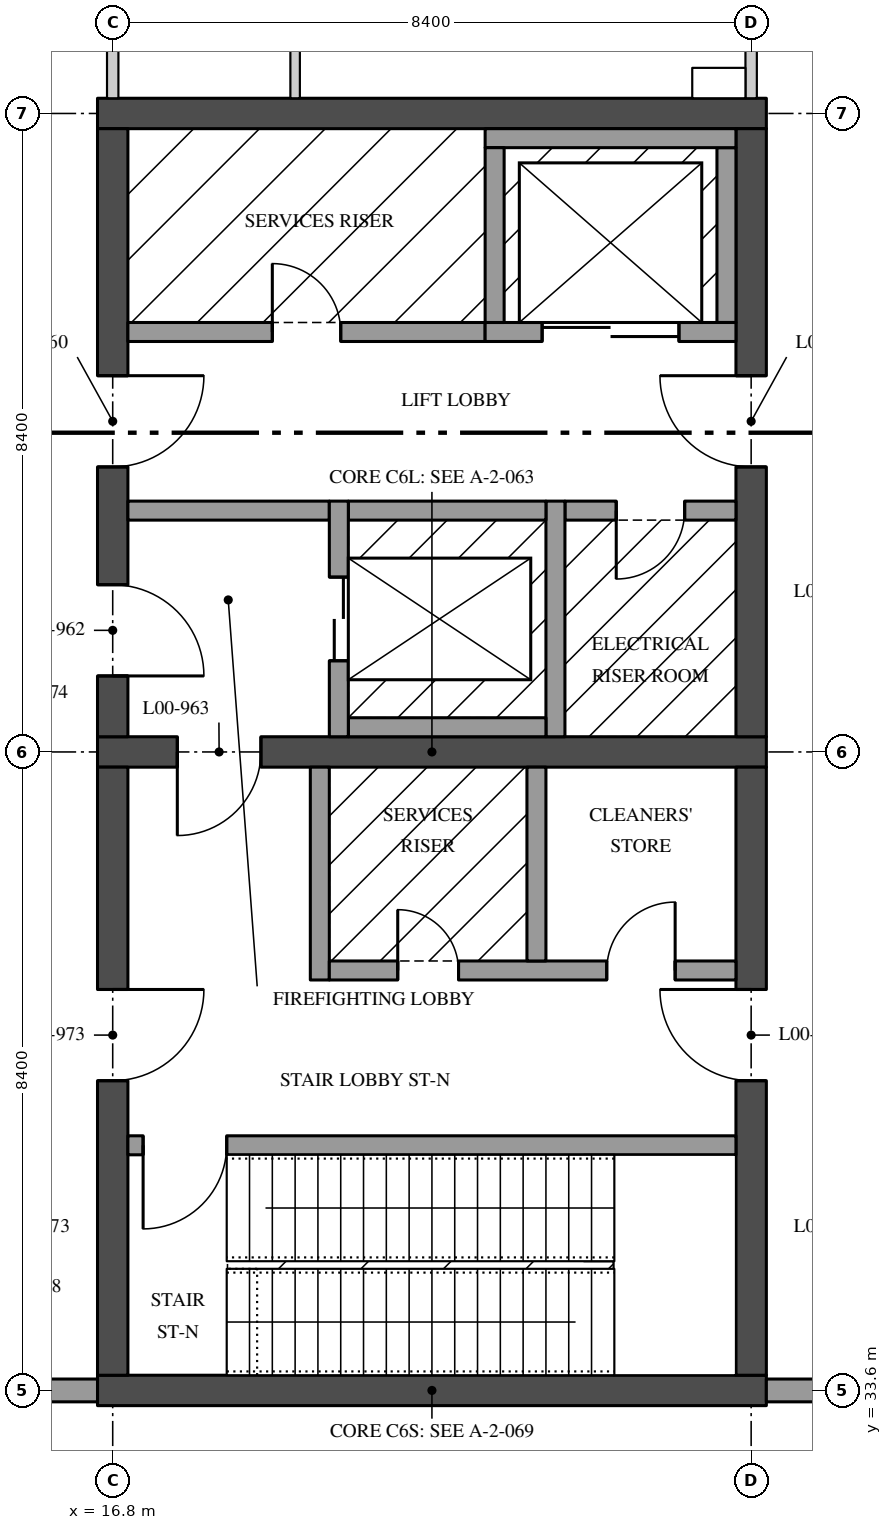
"""IFC4 building model, lengths in metres.
Left out: names, types, materials, properties, quantities, classifications, styles, units other than length and angle.
Written with IfcOpenShell. Run it as: python <this file> out.ifc"""

import sys

from ifc_helpers import new_model, si_unit, direction, frame, frame_2d, origin, place, context, subcontext, project, spatial, rectangle, extrude, element, fill, save


model = new_model("IFC4")
c1 = context("Model", 3, precision=1e-05, world=origin(), true_north=direction((0.0, 1.0)))
c2 = subcontext(c1, "Body", "Model", "MODEL_VIEW")
j1 = project(units=[si_unit("LENGTHUNIT", "METRE"), si_unit("PLANEANGLEUNIT", "RADIAN")], contexts=[c1])
p1 = place(None, origin())
s1 = spatial("IfcSite", under=j1, at=p1, CompositionType="ELEMENT")
p2 = place(p1, origin())
s2 = spatial("IfcBuilding", under=s1, at=p2, CompositionType="ELEMENT")
p3 = place(p2, origin())
s3 = spatial("IfcBuildingStorey", under=s2, at=p3, CompositionType="ELEMENT", Elevation=0.0)
p4 = place(p3, frame((16.6, 42.0, 0.0), z_axis=(0.0, 0.0, 1.0), x_axis=(1.0, 0.0, 0.0)))
e1 = element("IfcWall", 1, at=p4, inside=s3, PredefinedType="SHEAR", context=c2, shape_type="SweptSolid", body=[
    extrude(rectangle(XDim=8.8, YDim=0.4, at=frame_2d((4.4, 0.0))), origin(), (0.0, 0.0, 1.0), 5.05),
])
p5 = place(p4, frame((1.05, 0.0, 0.0)))
e2 = element("IfcOpeningElement", 2, at=p5, cuts=e1, PredefinedType="OPENING", context=c2, shape_type="SweptSolid", body=[
    extrude(rectangle(XDim=1.1, YDim=2.1, at=frame_2d((0.55, 1.05))), frame((0.0, 0.21, 0.0), z_axis=(0.0, -1.0, 0.0), x_axis=(1.0, 0.0, 0.0)), (0.0, 0.0, 1.0), 0.42),
])
p6 = place(p3, frame((16.6, 50.4, 0.0), z_axis=(0.0, 0.0, 1.0), x_axis=(1.0, 0.0, 0.0)))
e3 = element("IfcWall", 3, at=p6, inside=s3, PredefinedType="SHEAR", context=c2, shape_type="SweptSolid", body=[
    extrude(rectangle(XDim=8.8, YDim=0.4, at=frame_2d((4.4, 0.0))), origin(), (0.0, 0.0, 1.0), 5.05),
])
p7 = place(p3, frame((16.8, 42.2, 0.0), z_axis=(0.0, 0.0, 1.0), x_axis=(0.0, 1.0, 0.0)))
e4 = element("IfcWall", 4, at=p7, inside=s3, PredefinedType="SHEAR", context=c2, shape_type="SweptSolid", body=[
    extrude(rectangle(XDim=8.0, YDim=0.4, at=frame_2d((4.0, 0.0))), origin(), (0.0, 0.0, 1.0), 5.05),
])
p8 = place(p7, frame((3.55, 0.0, 0.0)))
e5 = element("IfcOpeningElement", 5, at=p8, cuts=e4, PredefinedType="OPENING", context=c2, shape_type="SweptSolid", body=[
    extrude(rectangle(XDim=1.2, YDim=2.1, at=frame_2d((0.6, 1.05))), frame((0.0, 0.21, 0.0), z_axis=(0.0, -1.0, 0.0), x_axis=(1.0, 0.0, 0.0)), (0.0, 0.0, 1.0), 0.42),
])
p9 = place(p7, frame((0.8, 0.0, 0.0)))
e6 = element("IfcOpeningElement", 6, at=p9, cuts=e4, PredefinedType="OPENING", context=c2, shape_type="SweptSolid", body=[
    extrude(rectangle(XDim=1.2, YDim=2.1, at=frame_2d((0.6, 1.05))), frame((0.0, 0.21, 0.0), z_axis=(0.0, -1.0, 0.0), x_axis=(1.0, 0.0, 0.0)), (0.0, 0.0, 1.0), 0.42),
])
p10 = place(p3, frame((25.2, 42.2, 0.0), z_axis=(0.0, 0.0, 1.0), x_axis=(0.0, 1.0, 0.0)))
e7 = element("IfcWall", 7, at=p10, inside=s3, PredefinedType="SHEAR", context=c2, shape_type="SweptSolid", body=[
    extrude(rectangle(XDim=8.0, YDim=0.4, at=frame_2d((4.0, 0.0))), origin(), (0.0, 0.0, 1.0), 5.05),
])
p11 = place(p10, frame((3.55, 0.0, 0.0)))
e8 = element("IfcOpeningElement", 8, at=p11, cuts=e7, PredefinedType="OPENING", context=c2, shape_type="SweptSolid", body=[
    extrude(rectangle(XDim=1.2, YDim=2.1, at=frame_2d((0.6, 1.05))), frame((0.0, 0.21, 0.0), z_axis=(0.0, -1.0, 0.0), x_axis=(1.0, 0.0, 0.0)), (0.0, 0.0, 1.0), 0.42),
])
p12 = place(p3, frame((21.7, 47.525, 0.0), z_axis=(0.0, 0.0, 1.0), x_axis=(-1.0, 0.0, 0.0)))
e9 = element("IfcWall", 9, at=p12, inside=s3, PredefinedType="SOLIDWALL", context=c2, shape_type="SweptSolid", body=[
    extrude(rectangle(XDim=4.7, YDim=0.25, at=frame_2d((2.35, 0.0))), origin(), (0.0, 0.0, 1.0), 5.05),
])
p13 = place(p12, frame((1.9, 0.0, 0.0)))
e10 = element("IfcOpeningElement", 10, at=p13, cuts=e9, PredefinedType="OPENING", context=c2, shape_type="SweptSolid", body=[
    extrude(rectangle(XDim=0.9, YDim=2.1, at=frame_2d((0.45, 1.05))), frame((0.0, 0.135, 0.0), z_axis=(0.0, -1.0, 0.0), x_axis=(1.0, 0.0, 0.0)), (0.0, 0.0, 1.0), 0.27),
])
p14 = place(p3, frame((25.0, 45.175, 0.0), z_axis=(0.0, 0.0, 1.0), x_axis=(-1.0, 0.0, 0.0)))
e11 = element("IfcWall", 11, at=p14, inside=s3, PredefinedType="SOLIDWALL", context=c2, shape_type="SweptSolid", body=[
    extrude(rectangle(XDim=2.25, YDim=0.25, at=frame_2d((1.125, 0.0))), origin(), (0.0, 0.0, 1.0), 5.05),
])
p15 = place(p14, frame((0.675, 0.0, 0.0)))
e12 = element("IfcOpeningElement", 12, at=p15, cuts=e11, PredefinedType="OPENING", context=c2, shape_type="SweptSolid", body=[
    extrude(rectangle(XDim=0.9, YDim=2.1, at=frame_2d((0.45, 1.05))), frame((0.0, 0.135, 0.0), z_axis=(0.0, -1.0, 0.0), x_axis=(1.0, 0.0, 0.0)), (0.0, 0.0, 1.0), 0.27),
])
p16 = place(p3, frame((19.65, 45.175, 0.0), z_axis=(0.0, 0.0, 1.0), x_axis=(-1.0, 0.0, 0.0)))
e13 = element("IfcWall", 13, at=p16, inside=s3, PredefinedType="SOLIDWALL", context=c2, shape_type="SweptSolid", body=[
    extrude(rectangle(XDim=2.65, YDim=0.25, at=frame_2d((1.325, 0.0))), origin(), (0.0, 0.0, 1.0), 5.05),
])
p17 = place(p3, frame((16.6, 33.6, 0.0), z_axis=(0.0, 0.0, 1.0), x_axis=(1.0, 0.0, 0.0)))
e14 = element("IfcWall", 14, at=p17, inside=s3, PredefinedType="SHEAR", context=c2, shape_type="SweptSolid", body=[
    extrude(rectangle(XDim=8.8, YDim=0.4, at=frame_2d((4.4, 0.0))), origin(), (0.0, 0.0, 1.0), 5.05),
])
p18 = place(p3, frame((16.8, 33.8, 0.0), z_axis=(0.0, 0.0, 1.0), x_axis=(0.0, 1.0, 0.0)))
e15 = element("IfcWall", 15, at=p18, inside=s3, PredefinedType="SHEAR", context=c2, shape_type="SweptSolid", body=[
    extrude(rectangle(XDim=8.0, YDim=0.4, at=frame_2d((4.0, 0.0))), origin(), (0.0, 0.0, 1.0), 5.05),
])
p19 = place(p18, frame((3.875, 0.0, 0.0)))
e16 = element("IfcOpeningElement", 16, at=p19, cuts=e15, PredefinedType="OPENING", context=c2, shape_type="SweptSolid", body=[
    extrude(rectangle(XDim=1.2, YDim=2.1, at=frame_2d((0.6, 1.05))), frame((0.0, 0.21, 0.0), z_axis=(0.0, -1.0, 0.0), x_axis=(1.0, 0.0, 0.0)), (0.0, 0.0, 1.0), 0.42),
])
p20 = place(p3, frame((25.2, 33.8, 0.0), z_axis=(0.0, 0.0, 1.0), x_axis=(0.0, 1.0, 0.0)))
e17 = element("IfcWall", 17, at=p20, inside=s3, PredefinedType="SHEAR", context=c2, shape_type="SweptSolid", body=[
    extrude(rectangle(XDim=8.0, YDim=0.4, at=frame_2d((4.0, 0.0))), origin(), (0.0, 0.0, 1.0), 5.05),
])
p21 = place(p20, frame((3.875, 0.0, 0.0)))
e18 = element("IfcOpeningElement", 18, at=p21, cuts=e17, PredefinedType="OPENING", context=c2, shape_type="SweptSolid", body=[
    extrude(rectangle(XDim=1.2, YDim=2.1, at=frame_2d((0.6, 1.05))), frame((0.0, 0.21, 0.0), z_axis=(0.0, -1.0, 0.0), x_axis=(1.0, 0.0, 0.0)), (0.0, 0.0, 1.0), 0.42),
])
p22 = place(p3, frame((17.0, 36.825, 0.0), z_axis=(0.0, 0.0, 1.0), x_axis=(1.0, 0.0, 0.0)))
e19 = element("IfcWall", 19, at=p22, inside=s3, PredefinedType="SOLIDWALL", context=c2, shape_type="SweptSolid", body=[
    extrude(rectangle(XDim=8.0, YDim=0.25, at=frame_2d((4.0, 0.0))), origin(), (0.0, 0.0, 1.0), 5.05),
])
p23 = place(p22, frame((0.2, 0.0, 0.0)))
e20 = element("IfcOpeningElement", 20, at=p23, cuts=e19, PredefinedType="OPENING", context=c2, shape_type="SweptSolid", body=[
    extrude(rectangle(XDim=1.1, YDim=2.1, at=frame_2d((0.55, 1.05))), frame((0.0, 0.135, 0.0), z_axis=(0.0, -1.0, 0.0), x_axis=(1.0, 0.0, 0.0)), (0.0, 0.0, 1.0), 0.27),
])
p24 = place(p3, frame((19.525, 39.0, 0.0), z_axis=(0.0, 0.0, 1.0), x_axis=(0.0, 1.0, 0.0)))
e21 = element("IfcWall", 21, at=p24, inside=s3, PredefinedType="SOLIDWALL", context=c2, shape_type="SweptSolid", body=[
    extrude(rectangle(XDim=2.8, YDim=0.25, at=frame_2d((1.4, 0.0))), origin(), (0.0, 0.0, 1.0), 5.05),
])
p25 = place(p3, frame((19.65, 39.125, 0.0), z_axis=(0.0, 0.0, 1.0), x_axis=(1.0, 0.0, 0.0)))
e22 = element("IfcWall", 22, at=p25, inside=s3, PredefinedType="SOLIDWALL", context=c2, shape_type="SweptSolid", body=[
    extrude(rectangle(XDim=5.35, YDim=0.25, at=frame_2d((2.675, 0.0))), origin(), (0.0, 0.0, 1.0), 5.05),
])
p26 = place(p25, frame((3.65, 0.0, 0.0)))
e23 = element("IfcOpeningElement", 23, at=p26, cuts=e22, PredefinedType="OPENING", context=c2, shape_type="SweptSolid", body=[
    extrude(rectangle(XDim=0.9, YDim=2.1, at=frame_2d((0.45, 1.05))), frame((0.0, 0.135, 0.0), z_axis=(0.0, -1.0, 0.0), x_axis=(1.0, 0.0, 0.0)), (0.0, 0.0, 1.0), 0.27),
])
p27 = place(p25, frame((0.9, 0.0, 0.0)))
e24 = element("IfcOpeningElement", 24, at=p27, cuts=e22, PredefinedType="OPENING", context=c2, shape_type="SweptSolid", body=[
    extrude(rectangle(XDim=0.8, YDim=2.1, at=frame_2d((0.4, 1.05))), frame((0.0, 0.135, 0.0), z_axis=(0.0, -1.0, 0.0), x_axis=(1.0, 0.0, 0.0)), (0.0, 0.0, 1.0), 0.27),
])
p28 = place(p3, frame((22.375, 39.25, 0.0), z_axis=(0.0, 0.0, 1.0), x_axis=(0.0, 1.0, 0.0)))
e25 = element("IfcWall", 25, at=p28, inside=s3, PredefinedType="SOLIDWALL", context=c2, shape_type="SweptSolid", body=[
    extrude(rectangle(XDim=2.55, YDim=0.25, at=frame_2d((1.275, 0.0))), origin(), (0.0, 0.0, 1.0), 5.05),
])
p29 = place(p3, frame((24.875, 47.65, 0.0), z_axis=(0.0, 0.0, 1.0), x_axis=(0.0, 1.0, 0.0)))
e26 = element("IfcWall", 26, at=p29, inside=s3, PredefinedType="SOLIDWALL", context=c2, shape_type="SweptSolid", body=[
    extrude(rectangle(XDim=2.3, YDim=0.25, at=frame_2d((1.15, 0.0))), origin(), (0.0, 0.0, 1.0), 5.05),
])
p30 = place(p3, frame((21.7, 50.075, 0.0), z_axis=(0.0, 0.0, 1.0), x_axis=(1.0, 0.0, 0.0)))
e27 = element("IfcWall", 27, at=p30, inside=s3, PredefinedType="SOLIDWALL", context=c2, shape_type="SweptSolid", body=[
    extrude(rectangle(XDim=3.3, YDim=0.25, at=frame_2d((1.65, 0.0))), origin(), (0.0, 0.0, 1.0), 5.05),
])
p31 = place(p3, frame((21.7, 47.525, 0.0), z_axis=(0.0, 0.0, 1.0), x_axis=(1.0, 0.0, 0.0)))
e28 = element("IfcWall", 28, at=p31, inside=s3, PredefinedType="SOLIDWALL", context=c2, shape_type="SweptSolid", body=[
    extrude(rectangle(XDim=3.3, YDim=0.25, at=frame_2d((1.65, 0.0))), origin(), (0.0, 0.0, 1.0), 5.05),
])
p32 = place(p31, frame((0.75, 0.0, 0.0)))
e29 = element("IfcOpeningElement", 29, at=p32, cuts=e28, PredefinedType="OPENING", context=c2, shape_type="SweptSolid", body=[
    extrude(rectangle(XDim=1.8, YDim=2.1, at=frame_2d((0.9, 1.05))), frame((0.0, 0.135, 0.0), z_axis=(0.0, -1.0, 0.0), x_axis=(1.0, 0.0, 0.0)), (0.0, 0.0, 1.0), 0.27),
])
p33 = place(p3, frame((21.825, 47.65, 0.0), z_axis=(0.0, 0.0, 1.0), x_axis=(0.0, 1.0, 0.0)))
e30 = element("IfcWall", 30, at=p33, inside=s3, PredefinedType="SOLIDWALL", context=c2, shape_type="SweptSolid", body=[
    extrude(rectangle(XDim=2.3, YDim=0.25, at=frame_2d((1.15, 0.0))), origin(), (0.0, 0.0, 1.0), 5.05),
])
p34 = place(p3, frame((22.625, 42.2, 0.0), z_axis=(0.0, 0.0, 1.0), x_axis=(0.0, 1.0, 0.0)))
e31 = element("IfcWall", 31, at=p34, inside=s3, PredefinedType="SOLIDWALL", context=c2, shape_type="SweptSolid", body=[
    extrude(rectangle(XDim=3.1, YDim=0.25, at=frame_2d((1.55, 0.0))), origin(), (0.0, 0.0, 1.0), 5.05),
])
for number, where, z_axis, x_axis in (
    (32, (19.9, 45.175, 0.0), (0.0, 0.0, 1.0), (1.0, 0.0, 0.0)),
    (33, (19.9, 42.325, 0.0), (0.0, 0.0, 1.0), (1.0, 0.0, 0.0)),
):
    element("IfcWall", number, at=place(p3, frame(where, z_axis=z_axis, x_axis=x_axis)), inside=s3, PredefinedType="SOLIDWALL", context=c2, shape_type="SweptSolid", body=[
        extrude(rectangle(XDim=2.6, YDim=0.25, at=frame_2d((1.3, 0.0))), origin(), (0.0, 0.0, 1.0), 5.05),
    ])
p35 = place(p3, frame((19.775, 42.2, 0.0), z_axis=(0.0, 0.0, 1.0), x_axis=(0.0, 1.0, 0.0)))
e34 = element("IfcWall", 34, at=p35, inside=s3, PredefinedType="SOLIDWALL", context=c2, shape_type="SweptSolid", body=[
    extrude(rectangle(XDim=3.1, YDim=0.25, at=frame_2d((1.55, 0.0))), origin(), (0.0, 0.0, 1.0), 5.05),
])
p36 = place(p35, frame((1.0, 0.0, 0.0)))
e35 = element("IfcOpeningElement", 35, at=p36, cuts=e34, PredefinedType="OPENING", context=c2, shape_type="SweptSolid", body=[
    extrude(rectangle(XDim=1.1, YDim=2.1, at=frame_2d((0.55, 1.05))), frame((0.0, 0.135, 0.0), z_axis=(0.0, -1.0, 0.0), x_axis=(1.0, 0.0, 0.0)), (0.0, 0.0, 1.0), 0.27),
])
p37 = place(p3, frame((25.2, 50.6, 0.0), z_axis=(0.0, 0.0, 1.0), x_axis=(0.0, 1.0, 0.0)))
e36 = element("IfcWall", 36, at=p37, inside=s3, PredefinedType="PARTITIONING", context=c2, shape_type="SweptSolid", body=[
    extrude(rectangle(XDim=2.8, YDim=0.15, at=frame_2d((1.4, 0.0))), origin(), (0.0, 0.0, 1.0), 5.05),
])
p38 = place(p3, frame((16.8, 50.6, 0.0), z_axis=(0.0, 0.0, 1.0), x_axis=(0.0, 1.0, 0.0)))
e37 = element("IfcWall", 37, at=p38, inside=s3, PredefinedType="PARTITIONING", context=c2, shape_type="SweptSolid", body=[
    extrude(rectangle(XDim=8.0, YDim=0.15, at=frame_2d((4.0, 0.0))), origin(), (0.0, 0.0, 1.0), 5.05),
])
p39 = place(p38, frame((2.35, 0.0, 0.0)))
e38 = element("IfcOpeningElement", 38, at=p39, cuts=e37, PredefinedType="OPENING", context=c2, shape_type="SweptSolid", body=[
    extrude(rectangle(XDim=0.9, YDim=2.1, at=frame_2d((0.45, 1.05))), frame((0.0, 0.085, 0.0), z_axis=(0.0, -1.0, 0.0), x_axis=(1.0, 0.0, 0.0)), (0.0, 0.0, 1.0), 0.17),
])
p40 = place(p3, frame((19.2, 50.6, 0.0), z_axis=(0.0, 0.0, 1.0), x_axis=(0.0, 1.0, 0.0)))
e39 = element("IfcWall", 39, at=p40, inside=s3, PredefinedType="PARTITIONING", context=c2, shape_type="SweptSolid", body=[
    extrude(rectangle(XDim=2.8, YDim=0.125, at=frame_2d((1.4, 0.0))), origin(), (0.0, 0.0, 1.0), 5.05),
])
p41 = place(p40, frame((0.95, 0.0, 0.0)))
e40 = element("IfcOpeningElement", 40, at=p41, cuts=e39, PredefinedType="OPENING", context=c2, shape_type="SweptSolid", body=[
    extrude(rectangle(XDim=0.9, YDim=2.1, at=frame_2d((0.45, 1.05))), frame((0.0, 0.073, 0.0), z_axis=(0.0, -1.0, 0.0), x_axis=(1.0, 0.0, 0.0)), (0.0, 0.0, 1.0), 0.145),
])
for number, where, z_axis, x_axis in (
    (41, (33.17, 33.6, 0.0), (0.0, 0.0, 1.0), (-1.0, 0.0, 0.0)),
    (42, (16.6, 33.6, 0.0), (0.0, 0.0, 1.0), (-1.0, 0.0, 0.0)),
):
    element("IfcWall", number, at=place(p3, frame(where, z_axis=z_axis, x_axis=x_axis)), inside=s3, PredefinedType="SOLIDWALL", context=c2, shape_type="SweptSolid", body=[
        extrude(rectangle(XDim=7.77, YDim=0.3, at=frame_2d((3.885, 0.0))), origin(), (0.0, 0.0, 1.0), 5.05),
    ])
p42 = place(p8, frame((1.2, 0.0, 0.0), z_axis=(0.0, 0.0, 1.0), x_axis=(-1.0, 0.0, 0.0)))
e43 = element("IfcDoor", 43, at=p42, inside=s3, OperationType="SINGLE_SWING_RIGHT", PredefinedType="DOOR", context=c2, shape_type="SweptSolid", body=[
    extrude(rectangle(XDim=1.2, YDim=2.1, at=frame_2d((0.6, 1.05))), frame((0.0, 0.035, 0.0), z_axis=(0.0, -1.0, 0.0), x_axis=(1.0, 0.0, 0.0)), (0.0, 0.0, 1.0), 0.07),
])
fill(e5, e43)
p43 = place(p11, origin())
e44 = element("IfcDoor", 44, at=p43, inside=s3, OperationType="SINGLE_SWING_LEFT", PredefinedType="DOOR", context=c2, shape_type="SweptSolid", body=[
    extrude(rectangle(XDim=1.2, YDim=2.1, at=frame_2d((0.6, 1.05))), frame((0.0, 0.035, 0.0), z_axis=(0.0, -1.0, 0.0), x_axis=(1.0, 0.0, 0.0)), (0.0, 0.0, 1.0), 0.07),
])
fill(e8, e44)
p44 = place(p9, frame((1.2, 0.0, 0.0), z_axis=(0.0, 0.0, 1.0), x_axis=(-1.0, 0.0, 0.0)))
e45 = element("IfcDoor", 45, at=p44, inside=s3, OperationType="SINGLE_SWING_LEFT", PredefinedType="DOOR", context=c2, shape_type="SweptSolid", body=[
    extrude(rectangle(XDim=1.2, YDim=2.1, at=frame_2d((0.6, 1.05))), frame((0.0, 0.035, 0.0), z_axis=(0.0, -1.0, 0.0), x_axis=(1.0, 0.0, 0.0)), (0.0, 0.0, 1.0), 0.07),
])
fill(e6, e45)
p45 = place(p5, frame((1.1, 0.0, 0.0), z_axis=(0.0, 0.0, 1.0), x_axis=(-1.0, 0.0, 0.0)))
e46 = element("IfcDoor", 46, at=p45, inside=s3, OperationType="SINGLE_SWING_LEFT", PredefinedType="DOOR", context=c2, shape_type="SweptSolid", body=[
    extrude(rectangle(XDim=1.1, YDim=2.1, at=frame_2d((0.55, 1.05))), frame((0.0, 0.035, 0.0), z_axis=(0.0, -1.0, 0.0), x_axis=(1.0, 0.0, 0.0)), (0.0, 0.0, 1.0), 0.07),
])
fill(e2, e46)
p46 = place(p13, frame((0.9, 0.0, 0.0), z_axis=(0.0, 0.0, 1.0), x_axis=(-1.0, 0.0, 0.0)))
e47 = element("IfcDoor", 47, at=p46, inside=s3, OperationType="SINGLE_SWING_RIGHT", PredefinedType="DOOR", context=c2, shape_type="SweptSolid", body=[
    extrude(rectangle(XDim=0.9, YDim=2.1, at=frame_2d((0.45, 1.05))), frame((0.0, 0.035, 0.0), z_axis=(0.0, -1.0, 0.0), x_axis=(1.0, 0.0, 0.0)), (0.0, 0.0, 1.0), 0.07),
])
fill(e10, e47)
p47 = place(p15, origin())
e48 = element("IfcDoor", 48, at=p47, inside=s3, OperationType="SINGLE_SWING_LEFT", PredefinedType="DOOR", context=c2, shape_type="SweptSolid", body=[
    extrude(rectangle(XDim=0.9, YDim=2.1, at=frame_2d((0.45, 1.05))), frame((0.0, 0.05, 0.0), z_axis=(0.0, -1.0, 0.0), x_axis=(1.0, 0.0, 0.0)), (0.0, 0.0, 1.0), 0.1),
])
fill(e12, e48)
p48 = place(p26, origin())
e49 = element("IfcDoor", 49, at=p48, inside=s3, OperationType="SINGLE_SWING_LEFT", PredefinedType="DOOR", context=c2, shape_type="SweptSolid", body=[
    extrude(rectangle(XDim=0.9, YDim=2.1, at=frame_2d((0.45, 1.05))), frame((0.0, 0.035, 0.0), z_axis=(0.0, -1.0, 0.0), x_axis=(1.0, 0.0, 0.0)), (0.0, 0.0, 1.0), 0.07),
])
fill(e23, e49)
p49 = place(p19, frame((1.2, 0.0, 0.0), z_axis=(0.0, 0.0, 1.0), x_axis=(-1.0, 0.0, 0.0)))
e50 = element("IfcDoor", 50, at=p49, inside=s3, OperationType="SINGLE_SWING_RIGHT", PredefinedType="DOOR", context=c2, shape_type="SweptSolid", body=[
    extrude(rectangle(XDim=1.2, YDim=2.1, at=frame_2d((0.6, 1.05))), frame((0.0, 0.035, 0.0), z_axis=(0.0, -1.0, 0.0), x_axis=(1.0, 0.0, 0.0)), (0.0, 0.0, 1.0), 0.07),
])
fill(e16, e50)
p50 = place(p21, origin())
e51 = element("IfcDoor", 51, at=p50, inside=s3, OperationType="SINGLE_SWING_LEFT", PredefinedType="DOOR", context=c2, shape_type="SweptSolid", body=[
    extrude(rectangle(XDim=1.2, YDim=2.1, at=frame_2d((0.6, 1.05))), frame((0.0, 0.035, 0.0), z_axis=(0.0, -1.0, 0.0), x_axis=(1.0, 0.0, 0.0)), (0.0, 0.0, 1.0), 0.07),
])
fill(e18, e51)
p51 = place(p27, origin())
e52 = element("IfcDoor", 52, at=p51, inside=s3, OperationType="SINGLE_SWING_RIGHT", PredefinedType="DOOR", context=c2, shape_type="SweptSolid", body=[
    extrude(rectangle(XDim=0.8, YDim=2.1, at=frame_2d((0.4, 1.05))), frame((0.0, 0.035, 0.0), z_axis=(0.0, -1.0, 0.0), x_axis=(1.0, 0.0, 0.0)), (0.0, 0.0, 1.0), 0.07),
])
fill(e24, e52)
p52 = place(p23, frame((1.1, 0.0, 0.0), z_axis=(0.0, 0.0, 1.0), x_axis=(-1.0, 0.0, 0.0)))
e53 = element("IfcDoor", 53, at=p52, inside=s3, OperationType="SINGLE_SWING_LEFT", PredefinedType="DOOR", context=c2, shape_type="SweptSolid", body=[
    extrude(rectangle(XDim=1.1, YDim=2.1, at=frame_2d((0.55, 1.05))), frame((0.0, 0.035, 0.0), z_axis=(0.0, -1.0, 0.0), x_axis=(1.0, 0.0, 0.0)), (0.0, 0.0, 1.0), 0.07),
])
fill(e20, e53)
p53 = place(p32, origin())
e54 = element("IfcDoor", 54, at=p53, inside=s3, OperationType="DOUBLE_DOOR_SLIDING", PredefinedType="DOOR", context=c2, shape_type="SweptSolid", body=[
    extrude(rectangle(XDim=1.8, YDim=2.1, at=frame_2d((0.9, 1.05))), frame((0.0, 0.04, 0.0), z_axis=(0.0, -1.0, 0.0), x_axis=(1.0, 0.0, 0.0)), (0.0, 0.0, 1.0), 0.08),
])
fill(e29, e54)
p54 = place(p36, origin())
e55 = element("IfcDoor", 55, at=p54, inside=s3, OperationType="DOUBLE_DOOR_SLIDING", PredefinedType="DOOR", context=c2, shape_type="SweptSolid", body=[
    extrude(rectangle(XDim=1.1, YDim=2.1, at=frame_2d((0.55, 1.05))), frame((0.0, 0.04, 0.0), z_axis=(0.0, -1.0, 0.0), x_axis=(1.0, 0.0, 0.0)), (0.0, 0.0, 1.0), 0.08),
])
fill(e35, e55)
save(model, sys.argv[1])
